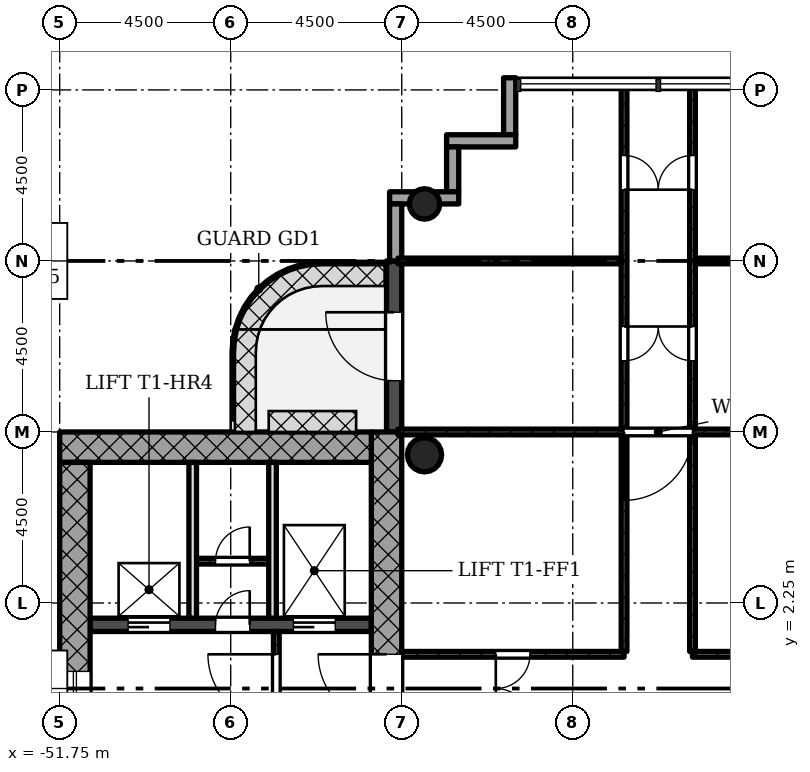
"""IFC4 building model, lengths in metres.
Left out: names, types, materials, properties, quantities, classifications, styles, units other than length and angle.
Written with IfcOpenShell. Run it as: python <this file> out.ifc"""

import sys

from ifc_helpers import new_model, si_unit, direction, frame, frame_2d, origin, origin_2d, place, context, subcontext, project, spatial, rectangle, hollow_circle, extrude, element, fill, save


model = new_model("IFC4")
c1 = context("Model", 3, precision=1e-05, world=origin(), true_north=direction((0.0, 1.0)))
c2 = subcontext(c1, "Body", "Model", "MODEL_VIEW")
j1 = project(units=[si_unit("LENGTHUNIT", "METRE"), si_unit("PLANEANGLEUNIT", "RADIAN")], contexts=[c1])
p1 = place(None, origin())
s1 = spatial("IfcSite", under=j1, at=p1, CompositionType="ELEMENT")
p2 = place(p1, origin())
s2 = spatial("IfcBuilding", under=s1, at=p2, CompositionType="ELEMENT")
p3 = place(p2, frame((0.0, 0.0, 181.3)))
s3 = spatial("IfcBuildingStorey", under=s2, at=p3, CompositionType="ELEMENT", Elevation=181.3)
p4 = place(p3, frame((-43.15, -5.95, 0.0), z_axis=(0.0, 0.0, 1.0), x_axis=(0.0, 1.0, 0.0)))
e1 = element("IfcWall", 1, at=p4, inside=s3, PredefinedType="SHEAR", context=c2, shape_type="SweptSolid", body=[
    extrude(rectangle(XDim=12.7, YDim=0.8, at=frame_2d((6.35, 0.0))), origin(), (0.0, 0.0, 1.0), 4.5),
])
p5 = place(p4, frame((5.05, 0.0, 0.0)))
e2 = element("IfcOpeningElement", 2, at=p5, cuts=e1, PredefinedType="OPENING", context=c2, shape_type="SweptSolid", body=[
    extrude(rectangle(XDim=1.8, YDim=2.1, at=frame_2d((0.9, 1.05))), frame((0.0, 0.41, 0.0), z_axis=(0.0, -1.0, 0.0), x_axis=(1.0, 0.0, 0.0)), (0.0, 0.0, 1.0), 0.82),
])
p6 = place(p3, frame((-43.55, 6.35, 0.0), z_axis=(0.0, 0.0, 1.0), x_axis=(-1.0, 0.0, 0.0)))
e3 = element("IfcWall", 3, at=p6, inside=s3, PredefinedType="SHEAR", context=c2, shape_type="SweptSolid", body=[
    extrude(rectangle(XDim=8.2, YDim=0.8, at=frame_2d((4.1, 0.0))), origin(), (0.0, 0.0, 1.0), 4.5),
])
p7 = place(p3, frame((-51.35, 5.95, 0.0), z_axis=(0.0, 0.0, 1.0), x_axis=(0.0, -1.0, 0.0)))
e4 = element("IfcWall", 4, at=p7, inside=s3, PredefinedType="SHEAR", context=c2, shape_type="SweptSolid", body=[
    extrude(rectangle(XDim=12.7, YDim=0.8, at=frame_2d((6.35, 0.0))), origin(), (0.0, 0.0, 1.0), 4.5),
])
p8 = place(p7, frame((5.5, 0.0, 0.45)))
e5 = element("IfcOpeningElement", 5, at=p8, cuts=e4, PredefinedType="OPENING", context=c2, shape_type="SweptSolid", body=[
    extrude(rectangle(XDim=0.9, YDim=2.4, at=frame_2d((0.45, 1.2))), frame((0.0, 0.41, 0.0), z_axis=(0.0, -1.0, 0.0), x_axis=(1.0, 0.0, 0.0)), (0.0, 0.0, 1.0), 0.82),
])
p9 = place(p3, frame((-50.95, 1.675, 0.0), z_axis=(0.0, 0.0, 1.0), x_axis=(1.0, 0.0, 0.0)))
e6 = element("IfcWall", 6, at=p9, inside=s3, PredefinedType="SHEAR", context=c2, shape_type="SweptSolid", body=[
    extrude(rectangle(XDim=7.4, YDim=0.35, at=frame_2d((3.7, 0.0))), origin(), (0.0, 0.0, 1.0), 4.5),
])
p10 = place(p9, frame((5.35, 0.0, 0.0)))
e7 = element("IfcOpeningElement", 7, at=p10, cuts=e6, PredefinedType="OPENING", context=c2, shape_type="SweptSolid", body=[
    extrude(rectangle(XDim=1.1, YDim=2.1, at=frame_2d((0.55, 1.05))), frame((0.0, 0.185, 0.0), z_axis=(0.0, -1.0, 0.0), x_axis=(1.0, 0.0, 0.0)), (0.0, 0.0, 1.0), 0.37),
])
p11 = place(p9, frame((1.0, 0.0, 0.0)))
e8 = element("IfcOpeningElement", 8, at=p11, cuts=e6, PredefinedType="OPENING", context=c2, shape_type="SweptSolid", body=[
    extrude(rectangle(XDim=1.1, YDim=2.1, at=frame_2d((0.55, 1.05))), frame((0.0, 0.185, 0.0), z_axis=(0.0, -1.0, 0.0), x_axis=(1.0, 0.0, 0.0)), (0.0, 0.0, 1.0), 0.37),
])
p12 = place(p9, frame((3.3, 0.0, 0.0)))
e9 = element("IfcOpeningElement", 9, at=p12, cuts=e6, PredefinedType="OPENING", context=c2, shape_type="SweptSolid", body=[
    extrude(rectangle(XDim=0.9, YDim=2.1, at=frame_2d((0.45, 1.05))), frame((0.0, 0.185, 0.0), z_axis=(0.0, -1.0, 0.0), x_axis=(1.0, 0.0, 0.0)), (0.0, 0.0, 1.0), 0.37),
])
p13 = place(p3, frame((-42.15, 12.75, 0.0), z_axis=(0.0, 0.0, 1.0), x_axis=(1.0, 0.0, 0.0)))
e10 = element("IfcColumn", 10, at=p13, inside=s3, PredefinedType="COLUMN", context=c2, shape_type="SweptSolid", body=[
    extrude(hollow_circle(Radius=0.4, WallThickness=0.028, at=origin_2d()), origin(), (0.0, 0.0, 1.0), 4.5),
])
p14 = place(p3, frame((-42.15, 6.15, 0.0), z_axis=(0.0, 0.0, 1.0), x_axis=(1.0, 0.0, 0.0)))
e11 = element("IfcColumn", 11, at=p14, inside=s3, PredefinedType="COLUMN", context=c2, shape_type="SweptSolid", body=[
    extrude(hollow_circle(Radius=0.45, WallThickness=0.032, at=origin_2d()), origin(), (0.0, 0.0, 1.0), 4.5),
])
p15 = place(p3, frame((-39.91, 16.07, -0.3), z_axis=(0.0, 0.0, 1.0), x_axis=(0.0, -1.0, 0.0)))
e12 = element("IfcWall", 12, at=p15, inside=s3, PredefinedType="STANDARD", context=c2, shape_type="SweptSolid", body=[
    extrude(rectangle(XDim=1.5, YDim=0.32, at=frame_2d((0.75, 0.0))), origin(), (0.0, 0.0, 1.0), 4.5),
])
p16 = place(p3, frame((-39.75, 14.41, -0.3), z_axis=(0.0, 0.0, 1.0), x_axis=(-1.0, 0.0, 0.0)))
e13 = element("IfcWall", 13, at=p16, inside=s3, PredefinedType="STANDARD", context=c2, shape_type="SweptSolid", body=[
    extrude(rectangle(XDim=1.82, YDim=0.32, at=frame_2d((0.91, 0.0))), origin(), (0.0, 0.0, 1.0), 4.5),
])
p17 = place(p3, frame((-41.41, 14.25, -0.3), z_axis=(0.0, 0.0, 1.0), x_axis=(0.0, -1.0, 0.0)))
e14 = element("IfcWall", 14, at=p17, inside=s3, PredefinedType="STANDARD", context=c2, shape_type="SweptSolid", body=[
    extrude(rectangle(XDim=1.18, YDim=0.32, at=frame_2d((0.59, 0.0))), origin(), (0.0, 0.0, 1.0), 4.5),
])
p18 = place(p3, frame((-41.25, 12.91, -0.3), z_axis=(0.0, 0.0, 1.0), x_axis=(-1.0, 0.0, 0.0)))
e15 = element("IfcWall", 15, at=p18, inside=s3, PredefinedType="STANDARD", context=c2, shape_type="SweptSolid", body=[
    extrude(rectangle(XDim=1.82, YDim=0.32, at=frame_2d((0.91, 0.0))), origin(), (0.0, 0.0, 1.0), 4.5),
])
p19 = place(p3, frame((-42.91, 12.75, -0.3), z_axis=(0.0, 0.0, 1.0), x_axis=(0.0, -1.0, 0.0)))
e16 = element("IfcWall", 16, at=p19, inside=s3, PredefinedType="STANDARD", context=c2, shape_type="SweptSolid", body=[
    extrude(rectangle(XDim=1.5, YDim=0.32, at=frame_2d((0.75, 0.0))), origin(), (0.0, 0.0, 1.0), 4.5),
])
p20 = place(p3, frame((-42.95, 11.25, -0.02), z_axis=(0.0, 0.0, 1.0), x_axis=(0.0, -1.0, 0.0)))
e17 = element("IfcWall", 17, at=p20, inside=s3, PredefinedType="STANDARD", context=c2, shape_type="SweptSolid", body=[
    extrude(rectangle(XDim=4.5, YDim=0.4, at=frame_2d((2.25, 0.0))), origin(), (0.0, 0.0, 1.0), 4.22),
])
p21 = place(p20, frame((1.35, 0.0, 0.02)))
e18 = element("IfcOpeningElement", 18, at=p21, cuts=e17, PredefinedType="OPENING", context=c2, shape_type="SweptSolid", body=[
    extrude(rectangle(XDim=1.8, YDim=2.1, at=frame_2d((0.9, 1.05))), frame((0.0, 0.21, 0.0), z_axis=(0.0, -1.0, 0.0), x_axis=(1.0, 0.0, 0.0)), (0.0, 0.0, 1.0), 0.42),
])
p22 = place(p3, frame((-46.05, 1.5, 0.0), z_axis=(0.0, 0.0, 1.0), x_axis=(0.0, -1.0, 0.0)))
e19 = element("IfcWall", 19, at=p22, inside=s3, PredefinedType="PARTITIONING", context=c2, shape_type="SweptSolid", body=[
    extrude(rectangle(XDim=3.0, YDim=0.15, at=frame_2d((1.5, 0.0))), origin(), (0.0, 0.0, 1.0), 4.08),
])
p23 = place(p22, frame((0.6, 0.0, 0.0)))
e20 = element("IfcOpeningElement", 20, at=p23, cuts=e19, PredefinedType="OPENING", context=c2, shape_type="SweptSolid", body=[
    extrude(rectangle(XDim=1.8, YDim=2.1, at=frame_2d((0.9, 1.05))), frame((0.0, 0.085, 0.0), z_axis=(0.0, -1.0, 0.0), x_axis=(1.0, 0.0, 0.0)), (0.0, 0.0, 1.0), 0.17),
])
for number, where, z_axis, x_axis in (
    (21, (-48.25, 5.95, 0.0), (0.0, 0.0, 1.0), (0.0, -1.0, 0.0)),
    (22, (-46.15, 5.95, 0.0), (0.0, 0.0, 1.0), (0.0, -1.0, 0.0)),
):
    element("IfcWall", number, at=place(p3, frame(where, z_axis=z_axis, x_axis=x_axis)), inside=s3, PredefinedType="SOLIDWALL", context=c2, shape_type="SweptSolid", body=[
        extrude(rectangle(XDim=4.1, YDim=0.2, at=frame_2d((2.05, 0.0))), origin(), (0.0, 0.0, 1.0), 4.08),
    ])
p24 = place(p3, frame((-46.15, 3.35, 0.0), z_axis=(0.0, 0.0, 1.0), x_axis=(-1.0, 0.0, 0.0)))
e23 = element("IfcWall", 23, at=p24, inside=s3, PredefinedType="PARTITIONING", context=c2, shape_type="SweptSolid", body=[
    extrude(rectangle(XDim=2.1, YDim=0.15, at=frame_2d((1.05, 0.0))), origin(), (0.0, 0.0, 1.0), 4.08),
])
p25 = place(p24, frame((0.6, 0.0, 0.0)))
e24 = element("IfcOpeningElement", 24, at=p25, cuts=e23, PredefinedType="OPENING", context=c2, shape_type="SweptSolid", body=[
    extrude(rectangle(XDim=0.9, YDim=2.1, at=frame_2d((0.45, 1.05))), frame((0.0, 0.085, 0.0), z_axis=(0.0, -1.0, 0.0), x_axis=(1.0, 0.0, 0.0)), (0.0, 0.0, 1.0), 0.17),
])
p26 = place(p3, frame((-35.1, 0.9, 0.0), z_axis=(0.0, 0.0, 1.0), x_axis=(1.0, 0.0, 0.0)))
e25 = element("IfcWall", 25, at=p26, inside=s3, PredefinedType="PARTITIONING", context=c2, shape_type="SweptSolid", body=[
    extrude(rectangle(XDim=5.85, YDim=0.15, at=frame_2d((2.925, 0.0))), origin(), (0.0, 0.0, 1.0), 4.08),
])
p27 = place(p26, frame((2.475, 0.0, 0.0)))
e26 = element("IfcOpeningElement", 26, at=p27, cuts=e25, PredefinedType="OPENING", context=c2, shape_type="SweptSolid", body=[
    extrude(rectangle(XDim=0.9, YDim=2.1, at=frame_2d((0.45, 1.05))), frame((0.0, 0.085, 0.0), z_axis=(0.0, -1.0, 0.0), x_axis=(1.0, 0.0, 0.0)), (0.0, 0.0, 1.0), 0.17),
])
p28 = place(p3, frame((-35.1, 0.975, 0.0), z_axis=(0.0, 0.0, 1.0), x_axis=(0.0, 1.0, 0.0)))
e27 = element("IfcWall", 27, at=p28, inside=s3, PredefinedType="PARTITIONING", context=c2, shape_type="SweptSolid", body=[
    extrude(rectangle(XDim=5.7, YDim=0.15, at=frame_2d((2.85, 0.0))), origin(), (0.0, 0.0, 1.0), 4.08),
])
p29 = place(p3, frame((-42.75, 0.9, 0.0), z_axis=(0.0, 0.0, 1.0), x_axis=(1.0, 0.0, 0.0)))
e28 = element("IfcWall", 28, at=p29, inside=s3, PredefinedType="PARTITIONING", context=c2, shape_type="SweptSolid", body=[
    extrude(rectangle(XDim=5.85, YDim=0.15, at=frame_2d((2.925, 0.0))), origin(), (0.0, 0.0, 1.0), 4.08),
])
p30 = place(p29, frame((2.475, 0.0, 0.0)))
e29 = element("IfcOpeningElement", 29, at=p30, cuts=e28, PredefinedType="OPENING", context=c2, shape_type="SweptSolid", body=[
    extrude(rectangle(XDim=0.9, YDim=2.1, at=frame_2d((0.45, 1.05))), frame((0.0, 0.085, 0.0), z_axis=(0.0, -1.0, 0.0), x_axis=(1.0, 0.0, 0.0)), (0.0, 0.0, 1.0), 0.17),
])
p31 = place(p3, frame((-36.9, 0.975, 0.0), z_axis=(0.0, 0.0, 1.0), x_axis=(0.0, 1.0, 0.0)))
e30 = element("IfcWall", 30, at=p31, inside=s3, PredefinedType="PARTITIONING", context=c2, shape_type="SweptSolid", body=[
    extrude(rectangle(XDim=5.7, YDim=0.15, at=frame_2d((2.85, 0.0))), origin(), (0.0, 0.0, 1.0), 4.08),
])
p32 = place(p3, frame((-42.85, 6.75, 0.0), z_axis=(0.0, 0.0, 1.0), x_axis=(1.0, 0.0, 0.0)))
e31 = element("IfcWall", 31, at=p32, inside=s3, PredefinedType="PARTITIONING", context=c2, shape_type="SweptSolid", body=[
    extrude(rectangle(XDim=13.7, YDim=0.15, at=frame_2d((6.85, 0.0))), origin(), (0.0, 0.0, 1.0), 4.08),
])
p33 = place(p32, frame((5.95, 0.0, 0.0)))
e32 = element("IfcOpeningElement", 32, at=p33, cuts=e31, PredefinedType="OPENING", context=c2, shape_type="SweptSolid", body=[
    extrude(rectangle(XDim=1.8, YDim=2.1, at=frame_2d((0.9, 1.05))), frame((0.0, 0.085, 0.0), z_axis=(0.0, -1.0, 0.0), x_axis=(1.0, 0.0, 0.0)), (0.0, 0.0, 1.0), 0.17),
])
p34 = place(p3, frame((-35.1, 6.825, 0.0), z_axis=(0.0, 0.0, 1.0), x_axis=(0.0, 1.0, 0.0)))
e33 = element("IfcWall", 33, at=p34, inside=s3, PredefinedType="PARTITIONING", context=c2, shape_type="SweptSolid", body=[
    extrude(rectangle(XDim=9.025, YDim=0.15, at=frame_2d((4.513, 0.0))), origin(), (0.0, 0.0, 1.0), 4.08),
])
p35 = place(p34, frame((1.8, 0.0, 0.0)))
e34 = element("IfcOpeningElement", 34, at=p35, cuts=e33, PredefinedType="OPENING", context=c2, shape_type="SweptSolid", body=[
    extrude(rectangle(XDim=0.9, YDim=2.1, at=frame_2d((0.45, 1.05))), frame((0.0, 0.085, 0.0), z_axis=(0.0, -1.0, 0.0), x_axis=(1.0, 0.0, 0.0)), (0.0, 0.0, 1.0), 0.17),
])
p36 = place(p34, frame((6.3, 0.0, 0.0)))
e35 = element("IfcOpeningElement", 35, at=p36, cuts=e33, PredefinedType="OPENING", context=c2, shape_type="SweptSolid", body=[
    extrude(rectangle(XDim=0.9, YDim=2.1, at=frame_2d((0.45, 1.05))), frame((0.0, 0.085, 0.0), z_axis=(0.0, -1.0, 0.0), x_axis=(1.0, 0.0, 0.0)), (0.0, 0.0, 1.0), 0.17),
])
p37 = place(p3, frame((-35.025, 11.25, 0.0), z_axis=(0.0, 0.0, 1.0), x_axis=(1.0, 0.0, 0.0)))
e36 = element("IfcWall", 36, at=p37, inside=s3, PredefinedType="PARTITIONING", context=c2, shape_type="SweptSolid", body=[
    extrude(rectangle(XDim=5.875, YDim=0.15, at=frame_2d((2.938, 0.0))), origin(), (0.0, 0.0, 1.0), 4.08),
])
p38 = place(p3, frame((-36.9, 6.825, 0.0), z_axis=(0.0, 0.0, 1.0), x_axis=(0.0, 1.0, 0.0)))
e37 = element("IfcWall", 37, at=p38, inside=s3, PredefinedType="PARTITIONING", context=c2, shape_type="SweptSolid", body=[
    extrude(rectangle(XDim=9.025, YDim=0.15, at=frame_2d((4.513, 0.0))), origin(), (0.0, 0.0, 1.0), 4.08),
])
p39 = place(p38, frame((1.8, 0.0, 0.0)))
e38 = element("IfcOpeningElement", 38, at=p39, cuts=e37, PredefinedType="OPENING", context=c2, shape_type="SweptSolid", body=[
    extrude(rectangle(XDim=0.9, YDim=2.1, at=frame_2d((0.45, 1.05))), frame((0.0, 0.085, 0.0), z_axis=(0.0, -1.0, 0.0), x_axis=(1.0, 0.0, 0.0)), (0.0, 0.0, 1.0), 0.17),
])
p40 = place(p38, frame((6.3, 0.0, 0.0)))
e39 = element("IfcOpeningElement", 39, at=p40, cuts=e37, PredefinedType="OPENING", context=c2, shape_type="SweptSolid", body=[
    extrude(rectangle(XDim=0.9, YDim=2.1, at=frame_2d((0.45, 1.05))), frame((0.0, 0.085, 0.0), z_axis=(0.0, -1.0, 0.0), x_axis=(1.0, 0.0, 0.0)), (0.0, 0.0, 1.0), 0.17),
])
p41 = place(p3, frame((-36.975, 11.25, 0.0), z_axis=(0.0, 0.0, 1.0), x_axis=(-1.0, 0.0, 0.0)))
e40 = element("IfcWall", 40, at=p41, inside=s3, PredefinedType="PARTITIONING", context=c2, shape_type="SweptSolid", body=[
    extrude(rectangle(XDim=5.875, YDim=0.15, at=frame_2d((2.938, 0.0))), origin(), (0.0, 0.0, 1.0), 4.08),
])
p42 = place(p21, origin())
e41 = element("IfcDoor", 41, at=p42, inside=s3, OperationType="SINGLE_SWING_LEFT", PredefinedType="DOOR", context=c2, shape_type="SweptSolid", body=[
    extrude(rectangle(XDim=1.8, YDim=2.1, at=frame_2d((0.9, 1.05))), frame((0.0, 0.025, 0.0), z_axis=(0.0, -1.0, 0.0), x_axis=(1.0, 0.0, 0.0)), (0.0, 0.0, 1.0), 0.05),
])
fill(e18, e41)
p43 = place(p8, origin())
e42 = element("IfcWindow", 42, at=p43, inside=s3, PartitioningType="SINGLE_PANEL", PredefinedType="WINDOW", context=c2, shape_type="SweptSolid", body=[
    extrude(rectangle(XDim=0.9, YDim=2.4, at=frame_2d((0.45, 1.2))), frame((0.0, 0.03, 0.0), z_axis=(0.0, -1.0, 0.0), x_axis=(1.0, 0.0, 0.0)), (0.0, 0.0, 1.0), 0.06),
])
fill(e5, e42)
p44 = place(p23, origin())
e43 = element("IfcDoor", 43, at=p44, inside=s3, OperationType="SINGLE_SWING_LEFT", PredefinedType="DOOR", context=c2, shape_type="SweptSolid", body=[
    extrude(rectangle(XDim=1.8, YDim=2.1, at=frame_2d((0.9, 1.05))), frame((0.0, 0.025, 0.0), z_axis=(0.0, -1.0, 0.0), x_axis=(1.0, 0.0, 0.0)), (0.0, 0.0, 1.0), 0.05),
])
fill(e20, e43)
p45 = place(p25, origin())
e44 = element("IfcDoor", 44, at=p45, inside=s3, OperationType="SINGLE_SWING_LEFT", PredefinedType="DOOR", context=c2, shape_type="SweptSolid", body=[
    extrude(rectangle(XDim=0.9, YDim=2.1, at=frame_2d((0.45, 1.05))), frame((0.0, 0.025, 0.0), z_axis=(0.0, -1.0, 0.0), x_axis=(1.0, 0.0, 0.0)), (0.0, 0.0, 1.0), 0.05),
])
fill(e24, e44)
p46 = place(p30, origin())
e45 = element("IfcDoor", 45, at=p46, inside=s3, OperationType="SINGLE_SWING_LEFT", PredefinedType="DOOR", context=c2, shape_type="SweptSolid", body=[
    extrude(rectangle(XDim=0.9, YDim=2.1, at=frame_2d((0.45, 1.05))), frame((0.0, 0.025, 0.0), z_axis=(0.0, -1.0, 0.0), x_axis=(1.0, 0.0, 0.0)), (0.0, 0.0, 1.0), 0.05),
])
fill(e29, e45)
p47 = place(p33, origin())
e46 = element("IfcDoor", 46, at=p47, inside=s3, OperationType="SINGLE_SWING_LEFT", PredefinedType="DOOR", context=c2, shape_type="SweptSolid", body=[
    extrude(rectangle(XDim=1.8, YDim=2.1, at=frame_2d((0.9, 1.05))), frame((0.0, 0.025, 0.0), z_axis=(0.0, -1.0, 0.0), x_axis=(1.0, 0.0, 0.0)), (0.0, 0.0, 1.0), 0.05),
])
fill(e32, e46)
p48 = place(p35, origin())
e47 = element("IfcDoor", 47, at=p48, inside=s3, OperationType="SINGLE_SWING_LEFT", PredefinedType="DOOR", context=c2, shape_type="SweptSolid", body=[
    extrude(rectangle(XDim=0.9, YDim=2.1, at=frame_2d((0.45, 1.05))), frame((0.0, 0.025, 0.0), z_axis=(0.0, -1.0, 0.0), x_axis=(1.0, 0.0, 0.0)), (0.0, 0.0, 1.0), 0.05),
])
fill(e34, e47)
p49 = place(p36, origin())
e48 = element("IfcDoor", 48, at=p49, inside=s3, OperationType="SINGLE_SWING_RIGHT", PredefinedType="DOOR", context=c2, shape_type="SweptSolid", body=[
    extrude(rectangle(XDim=0.9, YDim=2.1, at=frame_2d((0.45, 1.05))), frame((0.0, 0.025, 0.0), z_axis=(0.0, -1.0, 0.0), x_axis=(1.0, 0.0, 0.0)), (0.0, 0.0, 1.0), 0.05),
])
fill(e35, e48)
p50 = place(p39, origin())
e49 = element("IfcDoor", 49, at=p50, inside=s3, OperationType="SINGLE_SWING_RIGHT", PredefinedType="DOOR", context=c2, shape_type="SweptSolid", body=[
    extrude(rectangle(XDim=0.9, YDim=2.1, at=frame_2d((0.45, 1.05))), frame((0.0, 0.025, 0.0), z_axis=(0.0, -1.0, 0.0), x_axis=(1.0, 0.0, 0.0)), (0.0, 0.0, 1.0), 0.05),
])
fill(e38, e49)
p51 = place(p40, origin())
e50 = element("IfcDoor", 50, at=p51, inside=s3, OperationType="SINGLE_SWING_LEFT", PredefinedType="DOOR", context=c2, shape_type="SweptSolid", body=[
    extrude(rectangle(XDim=0.9, YDim=2.1, at=frame_2d((0.45, 1.05))), frame((0.0, 0.025, 0.0), z_axis=(0.0, -1.0, 0.0), x_axis=(1.0, 0.0, 0.0)), (0.0, 0.0, 1.0), 0.05),
])
fill(e39, e50)
p52 = place(p10, origin())
e51 = element("IfcDoor", 51, at=p52, inside=s3, OperationType="SLIDING_TO_LEFT", PredefinedType="DOOR", context=c2, shape_type="SweptSolid", body=[
    extrude(rectangle(XDim=1.1, YDim=2.1, at=frame_2d((0.55, 1.05))), frame((0.0, 0.025, 0.0), z_axis=(0.0, -1.0, 0.0), x_axis=(1.0, 0.0, 0.0)), (0.0, 0.0, 1.0), 0.05),
])
fill(e7, e51)
p53 = place(p11, origin())
e52 = element("IfcDoor", 52, at=p53, inside=s3, OperationType="SLIDING_TO_LEFT", PredefinedType="DOOR", context=c2, shape_type="SweptSolid", body=[
    extrude(rectangle(XDim=1.1, YDim=2.1, at=frame_2d((0.55, 1.05))), frame((0.0, 0.025, 0.0), z_axis=(0.0, -1.0, 0.0), x_axis=(1.0, 0.0, 0.0)), (0.0, 0.0, 1.0), 0.05),
])
fill(e8, e52)
p54 = place(p12, origin())
e53 = element("IfcDoor", 53, at=p54, inside=s3, OperationType="SINGLE_SWING_LEFT", PredefinedType="DOOR", context=c2, shape_type="SweptSolid", body=[
    extrude(rectangle(XDim=0.9, YDim=2.1, at=frame_2d((0.45, 1.05))), frame((0.0, 0.025, 0.0), z_axis=(0.0, -1.0, 0.0), x_axis=(1.0, 0.0, 0.0)), (0.0, 0.0, 1.0), 0.05),
])
fill(e9, e53)
p55 = place(p5, origin())
e54 = element("IfcDoor", 54, at=p55, inside=s3, OperationType="SINGLE_SWING_LEFT", PredefinedType="DOOR", context=c2, shape_type="SweptSolid", body=[
    extrude(rectangle(XDim=1.8, YDim=2.1, at=frame_2d((0.9, 1.05))), frame((0.0, 0.025, 0.0), z_axis=(0.0, -1.0, 0.0), x_axis=(1.0, 0.0, 0.0)), (0.0, 0.0, 1.0), 0.05),
])
fill(e2, e54)
save(model, sys.argv[1])
